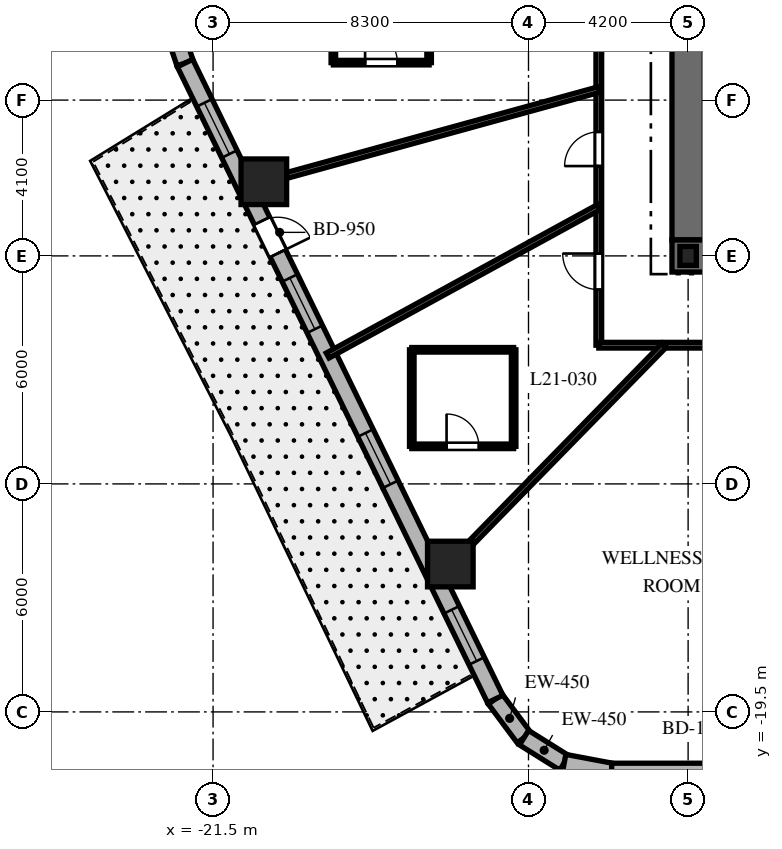
"""IFC4 building model, lengths in metres.
Left out: names, types, materials, properties, quantities, classifications, styles, units other than length and angle.
Written with IfcOpenShell. Run it as: python <this file> out.ifc"""

import sys

from ifc_helpers import new_model, si_unit, direction, frame, frame_2d, origin, origin_2d, place, context, subcontext, project, spatial, rectangle, i_section, extrude, element, fill, save


model = new_model("IFC4")
c1 = context("Model", 3, precision=1e-05, world=origin(), true_north=direction((0.0, 1.0)))
c2 = subcontext(c1, "Body", "Model", "MODEL_VIEW")
j1 = project(units=[si_unit("LENGTHUNIT", "METRE"), si_unit("PLANEANGLEUNIT", "RADIAN")], contexts=[c1])
p1 = place(None, origin())
s1 = spatial("IfcSite", under=j1, at=p1, CompositionType="ELEMENT")
p2 = place(p1, origin())
s2 = spatial("IfcBuilding", under=s1, at=p2, CompositionType="ELEMENT")
p3 = place(p2, frame((0.0, 0.0, 91.4)))
s3 = spatial("IfcBuildingStorey", under=s2, at=p3, CompositionType="ELEMENT", Elevation=91.4)
p4 = place(p3, frame((-9.425, -7.5, 0.0), z_axis=(0.0, 0.0, 1.0), x_axis=(1.0, 0.0, 0.0)))
e1 = element("IfcWall", 1, at=p4, inside=s3, PredefinedType="SHEAR", context=c2, shape_type="SweptSolid", body=[
    extrude(rectangle(XDim=18.85, YDim=0.85, at=frame_2d((9.425, 0.0))), origin(), (0.0, 0.0, 1.0), 3.7),
])
p5 = place(p4, frame((9.475, 0.0, 0.0)))
e2 = element("IfcOpeningElement", 2, at=p5, cuts=e1, PredefinedType="OPENING", context=c2, shape_type="SweptSolid", body=[
    extrude(rectangle(XDim=1.0, YDim=2.15, at=frame_2d((0.5, 1.075))), frame((0.0, 0.435, 0.0), z_axis=(0.0, -1.0, 0.0), x_axis=(1.0, 0.0, 0.0)), (0.0, 0.0, 1.0), 0.87),
])
p6 = place(p3, frame((-9.0, -7.075, 0.0), z_axis=(0.0, 0.0, 1.0), x_axis=(0.0, 1.0, 0.0)))
e3 = element("IfcWall", 3, at=p6, inside=s3, PredefinedType="SHEAR", context=c2, shape_type="SweptSolid", body=[
    extrude(rectangle(XDim=14.15, YDim=0.85, at=frame_2d((7.075, 0.0))), origin(), (0.0, 0.0, 1.0), 3.7),
])
p7 = place(p6, frame((10.2, 0.0, 0.0)))
e4 = element("IfcOpeningElement", 4, at=p7, cuts=e3, PredefinedType="OPENING", context=c2, shape_type="SweptSolid", body=[
    extrude(rectangle(XDim=1.05, YDim=2.15, at=frame_2d((0.525, 1.075))), frame((0.0, 0.435, 0.0), z_axis=(0.0, -1.0, 0.0), x_axis=(1.0, 0.0, 0.0)), (0.0, 0.0, 1.0), 0.87),
])
p8 = place(p3, frame((-9.0, -7.5, 0.0), z_axis=(0.0, 0.0, 1.0), x_axis=(1.0, 0.0, 0.0)))
e5 = element("IfcColumn", 5, at=p8, inside=s3, PredefinedType="COLUMN", context=c2, shape_type="SweptSolid", body=[
    extrude(i_section(OverallWidth=0.432, OverallDepth=0.498, WebThickness=0.056, FlangeThickness=0.089, at=origin_2d()), origin(), (0.0, 0.0, 1.0), 3.7),
])
for number, where, z_axis, x_axis in (
    (6, (-20.164, -5.549, 0.0), (0.0, 0.0, 1.0), (1.0, 0.0, 0.0)),
    (7, (-15.257, -15.609, 0.0), (0.0, 0.0, 1.0), (1.0, 0.0, 0.0)),
):
    element("IfcColumn", number, at=place(p3, frame(where, z_axis=z_axis, x_axis=x_axis)), inside=s3, PredefinedType="COLUMN", context=c2, shape_type="SweptSolid", body=[
        extrude(rectangle(XDim=1.2, YDim=1.2, at=origin_2d()), origin(), (0.0, 0.0, 1.0), 3.7),
    ])
p9 = place(p3, frame((-14.076, -19.161, 0.0), z_axis=(0.0, 0.0, 1.0), x_axis=(0.597226657159, -0.802072515412, 0.0)))
e8 = element("IfcWall", 8, at=p9, inside=s3, PredefinedType="SOLIDWALL", context=c2, shape_type="SweptSolid", body=[
    extrude(rectangle(XDim=1.269, YDim=0.45, at=frame_2d((0.635, 0.0))), origin(), (0.0, 0.0, 1.0), 3.4),
])
p10 = place(p3, frame((-13.318, -20.179, 0.0), z_axis=(0.0, 0.0, 1.0), x_axis=(0.848031272749, -0.529946186362, 0.0)))
e9 = element("IfcWall", 9, at=p10, inside=s3, PredefinedType="SOLIDWALL", context=c2, shape_type="SweptSolid", body=[
    extrude(rectangle(XDim=1.248, YDim=0.45, at=frame_2d((0.624, 0.0))), origin(), (0.0, 0.0, 1.0), 3.4),
])
p11 = place(p3, frame((-12.259, -20.84, 0.0), z_axis=(0.0, 0.0, 1.0), x_axis=(0.982730354425, -0.185043374624, 0.0)))
e10 = element("IfcWall", 10, at=p11, inside=s3, PredefinedType="SOLIDWALL", context=c2, shape_type="SweptSolid", body=[
    extrude(rectangle(XDim=1.269, YDim=0.45, at=frame_2d((0.635, 0.0))), origin(), (0.0, 0.0, 1.0), 3.4),
])
p12 = place(p3, frame((-22.522, -1.577, 0.0), z_axis=(0.0, 0.0, 1.0), x_axis=(0.317372694837, -0.948300887151, 0.0)))
e11 = element("IfcWall", 11, at=p12, inside=s3, PredefinedType="SOLIDWALL", context=c2, shape_type="SweptSolid", body=[
    extrude(rectangle(XDim=0.896, YDim=0.45, at=frame_2d((0.448, 0.0))), origin(), (0.0, 0.0, 1.0), 3.4),
])
p13 = place(p3, frame((-11.012, -21.075, 0.0), z_axis=(0.0, 0.0, 1.0), x_axis=(1.0, 0.0, 0.0)))
e12 = element("IfcWall", 12, at=p13, inside=s3, PredefinedType="SOLIDWALL", context=c2, shape_type="SweptSolid", body=[
    extrude(rectangle(XDim=23.782, YDim=0.45, at=frame_2d((11.891, 0.0))), origin(), (0.0, 0.0, 1.0), 3.4),
])
p14 = place(p13, frame((2.473, 0.0, 0.0)))
e13 = element("IfcOpeningElement", 13, at=p14, cuts=e12, PredefinedType="OPENING", context=c2, shape_type="SweptSolid", body=[
    extrude(rectangle(XDim=1.0, YDim=2.15, at=frame_2d((0.5, 1.075))), frame((0.0, 0.235, 0.0), z_axis=(0.0, -1.0, 0.0), x_axis=(1.0, 0.0, 0.0)), (0.0, 0.0, 1.0), 0.47),
])
p15 = place(p13, frame((8.244, 0.0, 0.8)))
e14 = element("IfcOpeningElement", 14, at=p15, cuts=e12, PredefinedType="OPENING", context=c2, shape_type="SweptSolid", body=[
    extrude(rectangle(XDim=1.5, YDim=1.8, at=frame_2d((0.75, 0.9))), frame((0.0, 0.235, 0.0), z_axis=(0.0, -1.0, 0.0), x_axis=(1.0, 0.0, 0.0)), (0.0, 0.0, 1.0), 0.47),
])
p16 = place(p13, frame((14.811, 0.0, 0.8)))
e15 = element("IfcOpeningElement", 15, at=p16, cuts=e12, PredefinedType="OPENING", context=c2, shape_type="SweptSolid", body=[
    extrude(rectangle(XDim=1.5, YDim=1.8, at=frame_2d((0.75, 0.9))), frame((0.0, 0.235, 0.0), z_axis=(0.0, -1.0, 0.0), x_axis=(1.0, 0.0, 0.0)), (0.0, 0.0, 1.0), 0.47),
])
p17 = place(p13, frame((20.741, 0.0, 0.8)))
e16 = element("IfcOpeningElement", 16, at=p17, cuts=e12, PredefinedType="OPENING", context=c2, shape_type="SweptSolid", body=[
    extrude(rectangle(XDim=1.5, YDim=1.8, at=frame_2d((0.75, 0.9))), frame((0.0, 0.235, 0.0), z_axis=(0.0, -1.0, 0.0), x_axis=(1.0, 0.0, 0.0)), (0.0, 0.0, 1.0), 0.47),
])
p18 = place(p3, frame((-22.238, -2.427, 0.0), z_axis=(0.0, 0.0, 1.0), x_axis=(0.438374803278, -0.898792262901, 0.0)))
e17 = element("IfcWall", 17, at=p18, inside=s3, PredefinedType="SOLIDWALL", context=c2, shape_type="SweptSolid", body=[
    extrude(rectangle(XDim=18.618, YDim=0.45, at=frame_2d((9.309, 0.0))), origin(), (0.0, 0.0, 1.0), 3.4),
])
p19 = place(p18, frame((4.62, 0.0, 0.0)))
e18 = element("IfcOpeningElement", 18, at=p19, cuts=e17, PredefinedType="OPENING", context=c2, shape_type="SweptSolid", body=[
    extrude(rectangle(XDim=0.95, YDim=2.15, at=frame_2d((0.475, 1.075))), frame((0.0, 0.235, 0.0), z_axis=(0.0, -1.0, 0.0), x_axis=(1.0, 0.0, 0.0)), (0.0, 0.0, 1.0), 0.47),
])
p20 = place(p18, frame((1.163, 0.0, 0.8)))
e19 = element("IfcOpeningElement", 19, at=p20, cuts=e17, PredefinedType="OPENING", context=c2, shape_type="SweptSolid", body=[
    extrude(rectangle(XDim=1.5, YDim=1.8, at=frame_2d((0.75, 0.9))), frame((0.0, 0.235, 0.0), z_axis=(0.0, -1.0, 0.0), x_axis=(1.0, 0.0, 0.0)), (0.0, 0.0, 1.0), 0.47),
])
p21 = place(p18, frame((6.291, 0.0, 0.8)))
e20 = element("IfcOpeningElement", 20, at=p21, cuts=e17, PredefinedType="OPENING", context=c2, shape_type="SweptSolid", body=[
    extrude(rectangle(XDim=1.5, YDim=1.8, at=frame_2d((0.75, 0.9))), frame((0.0, 0.235, 0.0), z_axis=(0.0, -1.0, 0.0), x_axis=(1.0, 0.0, 0.0)), (0.0, 0.0, 1.0), 0.47),
])
p22 = place(p18, frame((10.831, 0.0, 0.8)))
e21 = element("IfcOpeningElement", 21, at=p22, cuts=e17, PredefinedType="OPENING", context=c2, shape_type="SweptSolid", body=[
    extrude(rectangle(XDim=1.5, YDim=1.8, at=frame_2d((0.75, 0.9))), frame((0.0, 0.235, 0.0), z_axis=(0.0, -1.0, 0.0), x_axis=(1.0, 0.0, 0.0)), (0.0, 0.0, 1.0), 0.47),
])
p23 = place(p18, frame((16.006, 0.0, 0.8)))
e22 = element("IfcOpeningElement", 22, at=p23, cuts=e17, PredefinedType="OPENING", context=c2, shape_type="SweptSolid", body=[
    extrude(rectangle(XDim=1.5, YDim=1.8, at=frame_2d((0.75, 0.9))), frame((0.0, 0.235, 0.0), z_axis=(0.0, -1.0, 0.0), x_axis=(1.0, 0.0, 0.0)), (0.0, 0.0, 1.0), 0.47),
])
p24 = place(p3, frame((-11.35, -9.85, 0.0), z_axis=(0.0, 0.0, 1.0), x_axis=(0.0, 1.0, 0.0)))
e23 = element("IfcWall", 23, at=p24, inside=s3, PredefinedType="PARTITIONING", context=c2, shape_type="SweptSolid", body=[
    extrude(rectangle(XDim=19.7, YDim=0.15, at=frame_2d((9.85, 0.0))), origin(), (0.0, 0.0, 1.0), 2.84),
])
p25 = place(p24, frame((15.205, 0.0, 0.0)))
e24 = element("IfcOpeningElement", 24, at=p25, cuts=e23, PredefinedType="OPENING", context=c2, shape_type="SweptSolid", body=[
    extrude(rectangle(XDim=0.95, YDim=2.03, at=frame_2d((0.475, 1.015))), frame((0.0, 0.085, 0.0), z_axis=(0.0, -1.0, 0.0), x_axis=(1.0, 0.0, 0.0)), (0.0, 0.0, 1.0), 0.17),
])
p26 = place(p24, frame((8.836, 0.0, 0.0)))
e25 = element("IfcOpeningElement", 25, at=p26, cuts=e23, PredefinedType="OPENING", context=c2, shape_type="SweptSolid", body=[
    extrude(rectangle(XDim=0.95, YDim=2.03, at=frame_2d((0.475, 1.015))), frame((0.0, 0.085, 0.0), z_axis=(0.0, -1.0, 0.0), x_axis=(1.0, 0.0, 0.0)), (0.0, 0.0, 1.0), 0.17),
])
p27 = place(p24, frame((4.714, 0.0, 0.0)))
e26 = element("IfcOpeningElement", 26, at=p27, cuts=e23, PredefinedType="OPENING", context=c2, shape_type="SweptSolid", body=[
    extrude(rectangle(XDim=0.9, YDim=2.03, at=frame_2d((0.45, 1.015))), frame((0.0, 0.085, 0.0), z_axis=(0.0, -1.0, 0.0), x_axis=(1.0, 0.0, 0.0)), (0.0, 0.0, 1.0), 0.17),
])
p28 = place(p24, frame((1.462, 0.0, 0.0)))
e27 = element("IfcOpeningElement", 27, at=p28, cuts=e23, PredefinedType="OPENING", context=c2, shape_type="SweptSolid", body=[
    extrude(rectangle(XDim=0.95, YDim=2.03, at=frame_2d((0.475, 1.015))), frame((0.0, 0.085, 0.0), z_axis=(0.0, -1.0, 0.0), x_axis=(1.0, 0.0, 0.0)), (0.0, 0.0, 1.0), 0.17),
])
p29 = place(p3, frame((11.35, -9.85, 0.0), z_axis=(0.0, 0.0, 1.0), x_axis=(-1.0, 0.0, 0.0)))
e28 = element("IfcWall", 28, at=p29, inside=s3, PredefinedType="PARTITIONING", context=c2, shape_type="SweptSolid", body=[
    extrude(rectangle(XDim=22.7, YDim=0.15, at=frame_2d((11.35, 0.0))), origin(), (0.0, 0.0, 1.0), 2.84),
])
p30 = place(p29, frame((17.237, 0.0, 0.0)))
e29 = element("IfcOpeningElement", 29, at=p30, cuts=e28, PredefinedType="OPENING", context=c2, shape_type="SweptSolid", body=[
    extrude(rectangle(XDim=0.95, YDim=2.03, at=frame_2d((0.475, 1.015))), frame((0.0, 0.085, 0.0), z_axis=(0.0, -1.0, 0.0), x_axis=(1.0, 0.0, 0.0)), (0.0, 0.0, 1.0), 0.17),
])
p31 = place(p29, frame((11.994, 0.0, 0.0)))
e30 = element("IfcOpeningElement", 30, at=p31, cuts=e28, PredefinedType="OPENING", context=c2, shape_type="SweptSolid", body=[
    extrude(rectangle(XDim=0.95, YDim=2.03, at=frame_2d((0.475, 1.015))), frame((0.0, 0.085, 0.0), z_axis=(0.0, -1.0, 0.0), x_axis=(1.0, 0.0, 0.0)), (0.0, 0.0, 1.0), 0.17),
])
p32 = place(p29, frame((8.559, 0.0, 0.0)))
e31 = element("IfcOpeningElement", 31, at=p32, cuts=e28, PredefinedType="OPENING", context=c2, shape_type="SweptSolid", body=[
    extrude(rectangle(XDim=0.95, YDim=2.03, at=frame_2d((0.475, 1.015))), frame((0.0, 0.085, 0.0), z_axis=(0.0, -1.0, 0.0), x_axis=(1.0, 0.0, 0.0)), (0.0, 0.0, 1.0), 0.17),
])
p33 = place(p29, frame((5.728, 0.0, 0.0)))
e32 = element("IfcOpeningElement", 32, at=p33, cuts=e28, PredefinedType="OPENING", context=c2, shape_type="SweptSolid", body=[
    extrude(rectangle(XDim=0.9, YDim=2.03, at=frame_2d((0.45, 1.015))), frame((0.0, 0.085, 0.0), z_axis=(0.0, -1.0, 0.0), x_axis=(1.0, 0.0, 0.0)), (0.0, 0.0, 1.0), 0.17),
])
p34 = place(p29, frame((2.093, 0.0, 0.0)))
e33 = element("IfcOpeningElement", 33, at=p34, cuts=e28, PredefinedType="OPENING", context=c2, shape_type="SweptSolid", body=[
    extrude(rectangle(XDim=0.95, YDim=2.03, at=frame_2d((0.475, 1.015))), frame((0.0, 0.085, 0.0), z_axis=(0.0, -1.0, 0.0), x_axis=(1.0, 0.0, 0.0)), (0.0, 0.0, 1.0), 0.17),
])
p35 = place(p3, frame((-11.35, -3.123, 0.0), z_axis=(0.0, 0.0, 1.0), x_axis=(-0.964151983214, -0.265350623261, 0.0)))
e34 = element("IfcWall", 34, at=p35, inside=s3, PredefinedType="PARTITIONING", context=c2, shape_type="SweptSolid", body=[
    extrude(rectangle(XDim=9.645, YDim=0.15, at=frame_2d((4.823, 0.0))), origin(), (0.0, 0.0, 1.0), 2.54),
])
p36 = place(p3, frame((-11.35, -6.215, 0.0), z_axis=(0.0, 0.0, 1.0), x_axis=(-0.877115535756, -0.480279436303, 0.0)))
e35 = element("IfcWall", 35, at=p36, inside=s3, PredefinedType="PARTITIONING", context=c2, shape_type="SweptSolid", body=[
    extrude(rectangle(XDim=8.134, YDim=0.15, at=frame_2d((4.067, 0.0))), origin(), (0.0, 0.0, 1.0), 2.54),
])
p37 = place(p3, frame((-9.628, -9.85, 0.0), z_axis=(0.0, 0.0, 1.0), x_axis=(-0.698992824326, -0.715128681805, 0.0)))
e36 = element("IfcWall", 36, at=p37, inside=s3, PredefinedType="PARTITIONING", context=c2, shape_type="SweptSolid", body=[
    extrude(rectangle(XDim=8.579, YDim=0.15, at=frame_2d((4.29, 0.0))), origin(), (0.0, 0.0, 1.0), 2.54),
])
p38 = place(p3, frame((-18.335, -2.414, 0.0), z_axis=(0.0, 0.0, 1.0), x_axis=(1.0, 0.0, 0.0)))
e37 = element("IfcWall", 37, at=p38, inside=s3, PredefinedType="PARTITIONING", context=c2, shape_type="SweptSolid", body=[
    extrude(rectangle(XDim=2.52, YDim=0.12, at=frame_2d((1.26, 0.0))), origin(), (0.0, 0.0, 1.0), 2.841),
])
p39 = place(p38, frame((0.835, 0.0, 0.0)))
e38 = element("IfcOpeningElement", 38, at=p39, cuts=e37, PredefinedType="OPENING", context=c2, shape_type="SweptSolid", body=[
    extrude(rectangle(XDim=0.85, YDim=2.03, at=frame_2d((0.425, 1.015))), frame((0.0, 0.07, 0.0), z_axis=(0.0, -1.0, 0.0), x_axis=(1.0, 0.0, 0.0)), (0.0, 0.0, 1.0), 0.14),
])
for number, where, z_axis, x_axis in (
    (39, (-15.815, -2.414, 0.0), (0.0, 0.0, 1.0), (0.0, 1.0, 0.0)),
    (40, (-18.335, 0.266, 0.0), (0.0, 0.0, 1.0), (0.0, -1.0, 0.0)),
):
    element("IfcWall", number, at=place(p3, frame(where, z_axis=z_axis, x_axis=x_axis)), inside=s3, PredefinedType="PARTITIONING", context=c2, shape_type="SweptSolid", body=[
        extrude(rectangle(XDim=2.68, YDim=0.12, at=frame_2d((1.34, 0.0))), origin(), (0.0, 0.0, 1.0), 3.4),
    ])
p40 = place(p3, frame((-16.271, -12.511, 0.0), z_axis=(0.0, 0.0, 1.0), x_axis=(1.0, 0.0, 0.0)))
e41 = element("IfcWall", 41, at=p40, inside=s3, PredefinedType="PARTITIONING", context=c2, shape_type="SweptSolid", body=[
    extrude(rectangle(XDim=2.68, YDim=0.12, at=frame_2d((1.34, 0.0))), origin(), (0.0, 0.0, 1.0), 3.4),
])
p41 = place(p40, frame((0.915, 0.0, 0.0)))
e42 = element("IfcOpeningElement", 42, at=p41, cuts=e41, PredefinedType="OPENING", context=c2, shape_type="SweptSolid", body=[
    extrude(rectangle(XDim=0.85, YDim=2.03, at=frame_2d((0.425, 1.015))), frame((0.0, 0.07, 0.0), z_axis=(0.0, -1.0, 0.0), x_axis=(1.0, 0.0, 0.0)), (0.0, 0.0, 1.0), 0.14),
])
p42 = place(p3, frame((-13.591, -12.511, 0.0), z_axis=(0.0, 0.0, 1.0), x_axis=(0.0, 1.0, 0.0)))
e43 = element("IfcWall", 43, at=p42, inside=s3, PredefinedType="PARTITIONING", context=c2, shape_type="SweptSolid", body=[
    extrude(rectangle(XDim=2.54, YDim=0.12, at=frame_2d((1.27, 0.0))), origin(), (0.0, 0.0, 1.0), 2.927),
])
p43 = place(p3, frame((-13.591, -9.971, 0.0), z_axis=(0.0, 0.0, 1.0), x_axis=(-1.0, 0.0, 0.0)))
e44 = element("IfcWall", 44, at=p43, inside=s3, PredefinedType="PARTITIONING", context=c2, shape_type="SweptSolid", body=[
    extrude(rectangle(XDim=2.68, YDim=0.12, at=frame_2d((1.34, 0.0))), origin(), (0.0, 0.0, 1.0), 2.927),
])
p44 = place(p3, frame((-16.271, -9.971, 0.0), z_axis=(0.0, 0.0, 1.0), x_axis=(0.0, -1.0, 0.0)))
e45 = element("IfcWall", 45, at=p44, inside=s3, PredefinedType="PARTITIONING", context=c2, shape_type="SweptSolid", body=[
    extrude(rectangle(XDim=2.54, YDim=0.12, at=frame_2d((1.27, 0.0))), origin(), (0.0, 0.0, 1.0), 3.4),
])
p45 = place(p19, origin())
e46 = element("IfcDoor", 46, at=p45, inside=s3, OperationType="SINGLE_SWING_RIGHT", PredefinedType="DOOR", context=c2, shape_type="SweptSolid", body=[
    extrude(rectangle(XDim=0.95, YDim=2.15, at=frame_2d((0.475, 1.075))), frame((0.0, 0.025, 0.0), z_axis=(0.0, -1.0, 0.0), x_axis=(1.0, 0.0, 0.0)), (0.0, 0.0, 1.0), 0.05),
])
fill(e18, e46)
p46 = place(p20, origin())
e47 = element("IfcWindow", 47, at=p46, inside=s3, PartitioningType="SINGLE_PANEL", PredefinedType="WINDOW", context=c2, shape_type="SweptSolid", body=[
    extrude(rectangle(XDim=1.5, YDim=1.8, at=frame_2d((0.75, 0.9))), frame((0.0, 0.03, 0.0), z_axis=(0.0, -1.0, 0.0), x_axis=(1.0, 0.0, 0.0)), (0.0, 0.0, 1.0), 0.06),
])
fill(e19, e47)
p47 = place(p21, origin())
e48 = element("IfcWindow", 48, at=p47, inside=s3, PartitioningType="SINGLE_PANEL", PredefinedType="WINDOW", context=c2, shape_type="SweptSolid", body=[
    extrude(rectangle(XDim=1.5, YDim=1.8, at=frame_2d((0.75, 0.9))), frame((0.0, 0.03, 0.0), z_axis=(0.0, -1.0, 0.0), x_axis=(1.0, 0.0, 0.0)), (0.0, 0.0, 1.0), 0.06),
])
fill(e20, e48)
p48 = place(p22, origin())
e49 = element("IfcWindow", 49, at=p48, inside=s3, PartitioningType="SINGLE_PANEL", PredefinedType="WINDOW", context=c2, shape_type="SweptSolid", body=[
    extrude(rectangle(XDim=1.5, YDim=1.8, at=frame_2d((0.75, 0.9))), frame((0.0, 0.03, 0.0), z_axis=(0.0, -1.0, 0.0), x_axis=(1.0, 0.0, 0.0)), (0.0, 0.0, 1.0), 0.06),
])
fill(e21, e49)
p49 = place(p23, origin())
e50 = element("IfcWindow", 50, at=p49, inside=s3, PartitioningType="SINGLE_PANEL", PredefinedType="WINDOW", context=c2, shape_type="SweptSolid", body=[
    extrude(rectangle(XDim=1.5, YDim=1.8, at=frame_2d((0.75, 0.9))), frame((0.0, 0.03, 0.0), z_axis=(0.0, -1.0, 0.0), x_axis=(1.0, 0.0, 0.0)), (0.0, 0.0, 1.0), 0.06),
])
fill(e22, e50)
p50 = place(p39, origin())
e51 = element("IfcDoor", 51, at=p50, inside=s3, OperationType="SINGLE_SWING_LEFT", PredefinedType="DOOR", context=c2, shape_type="SweptSolid", body=[
    extrude(rectangle(XDim=0.85, YDim=2.03, at=frame_2d((0.425, 1.015))), frame((0.0, 0.025, 0.0), z_axis=(0.0, -1.0, 0.0), x_axis=(1.0, 0.0, 0.0)), (0.0, 0.0, 1.0), 0.05),
])
fill(e38, e51)
p51 = place(p27, origin())
e52 = element("IfcDoor", 52, at=p51, inside=s3, OperationType="SINGLE_SWING_LEFT", PredefinedType="DOOR", context=c2, shape_type="SweptSolid", body=[
    extrude(rectangle(XDim=0.9, YDim=2.03, at=frame_2d((0.45, 1.015))), frame((0.0, 0.025, 0.0), z_axis=(0.0, -1.0, 0.0), x_axis=(1.0, 0.0, 0.0)), (0.0, 0.0, 1.0), 0.05),
])
fill(e26, e52)
p52 = place(p28, origin())
e53 = element("IfcDoor", 53, at=p52, inside=s3, OperationType="SINGLE_SWING_RIGHT", PredefinedType="DOOR", context=c2, shape_type="SweptSolid", body=[
    extrude(rectangle(XDim=0.95, YDim=2.03, at=frame_2d((0.475, 1.015))), frame((0.0, 0.025, 0.0), z_axis=(0.0, -1.0, 0.0), x_axis=(1.0, 0.0, 0.0)), (0.0, 0.0, 1.0), 0.05),
])
fill(e27, e53)
p53 = place(p41, origin())
e54 = element("IfcDoor", 54, at=p53, inside=s3, OperationType="SINGLE_SWING_LEFT", PredefinedType="DOOR", context=c2, shape_type="SweptSolid", body=[
    extrude(rectangle(XDim=0.85, YDim=2.03, at=frame_2d((0.425, 1.015))), frame((0.0, 0.025, 0.0), z_axis=(0.0, -1.0, 0.0), x_axis=(1.0, 0.0, 0.0)), (0.0, 0.0, 1.0), 0.05),
])
fill(e42, e54)
save(model, sys.argv[1])
